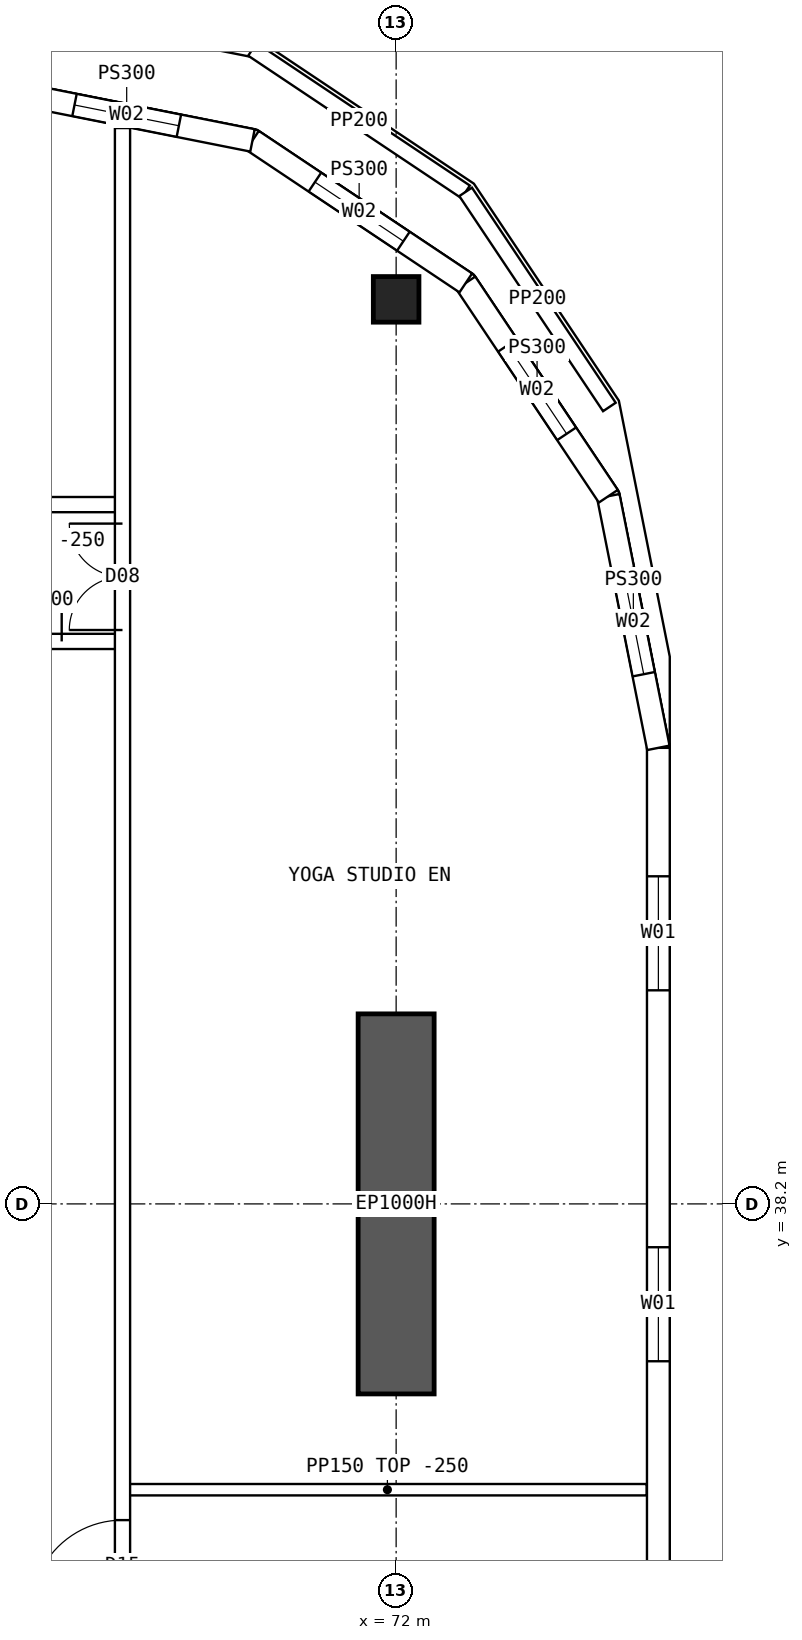
"""IFC4 building model, lengths in metres.
Left out: names, types, materials, properties, quantities, classifications, styles, units other than length and angle.
Written with IfcOpenShell. Run it as: python <this file> out.ifc"""

import sys

from ifc_helpers import new_model, si_unit, direction, frame, frame_2d, origin, origin_2d, place, context, subcontext, project, spatial, polyline, rectangle, hollow_rectangle, outline, extrude, element, fill, save


model = new_model("IFC4")
c1 = context("Model", 3, precision=1e-05, world=origin(), true_north=direction((0.0, 1.0)))
c2 = subcontext(c1, "Body", "Model", "MODEL_VIEW")
j1 = project(units=[si_unit("LENGTHUNIT", "METRE"), si_unit("PLANEANGLEUNIT", "RADIAN")], contexts=[c1])
p1 = place(None, origin())
s1 = spatial("IfcSite", under=j1, at=p1, CompositionType="ELEMENT")
p2 = place(p1, origin())
s2 = spatial("IfcBuilding", under=s1, at=p2, CompositionType="ELEMENT")
p3 = place(p2, frame((0.0, 0.0, 208.3)))
s3 = spatial("IfcBuildingStorey", under=s2, at=p3, CompositionType="ELEMENT", Elevation=208.3)
p4 = place(p3, frame((72.0, 50.1, 0.0), z_axis=(0.0, 0.0, 1.0), x_axis=(1.0, 0.0, 0.0)))
e1 = element("IfcColumn", 1, at=p4, inside=s3, PredefinedType="COLUMN", context=c2, shape_type="SweptSolid", body=[
    extrude(hollow_rectangle(XDim=0.6, YDim=0.6, WallThickness=0.06, at=origin_2d()), origin(), (0.0, 0.0, 1.0), 4.5),
])
p5 = place(p3, frame((72.0, 35.7, 0.0), z_axis=(0.0, 0.0, 1.0), x_axis=(0.0, 1.0, 0.0)))
e2 = element("IfcWall", 2, at=p5, inside=s3, PredefinedType="SHEAR", context=c2, shape_type="SweptSolid", body=[
    extrude(rectangle(XDim=5.0, YDim=1.0, at=frame_2d((2.5, 0.0))), origin(), (0.0, 0.0, 1.0), 4.5),
])
p6 = place(p3, frame((75.45, 19.8, 0.0), z_axis=(0.0, 0.0, 1.0), x_axis=(0.0, 1.0, 0.0)))
e3 = element("IfcWall", 3, at=p6, inside=s3, PredefinedType="SOLIDWALL", context=c2, shape_type="SweptSolid", body=[
    extrude(outline(polyline([(-0.015, -0.15), (24.415, -0.15), (24.385, 0.15), (0.015, 0.15), (-0.015, -0.15)])), origin(), (0.0, 0.0, 1.0), 4.25),
])
p7 = place(p6, frame((1.69, 0.0, 0.9)))
e4 = element("IfcOpeningElement", 4, at=p7, cuts=e3, PredefinedType="OPENING", context=c2, shape_type="SweptSolid", body=[
    extrude(rectangle(XDim=1.5, YDim=2.0, at=frame_2d((0.75, 1.0))), frame((0.0, 0.16, 0.0), z_axis=(0.0, -1.0, 0.0), x_axis=(1.0, 0.0, 0.0)), (0.0, 0.0, 1.0), 0.32),
])
p8 = place(p6, frame((6.57, 0.0, 0.9)))
e5 = element("IfcOpeningElement", 5, at=p8, cuts=e3, PredefinedType="OPENING", context=c2, shape_type="SweptSolid", body=[
    extrude(rectangle(XDim=1.5, YDim=2.0, at=frame_2d((0.75, 1.0))), frame((0.0, 0.16, 0.0), z_axis=(0.0, -1.0, 0.0), x_axis=(1.0, 0.0, 0.0)), (0.0, 0.0, 1.0), 0.32),
])
p9 = place(p6, frame((11.45, 0.0, 0.9)))
e6 = element("IfcOpeningElement", 6, at=p9, cuts=e3, PredefinedType="OPENING", context=c2, shape_type="SweptSolid", body=[
    extrude(rectangle(XDim=1.5, YDim=2.0, at=frame_2d((0.75, 1.0))), frame((0.0, 0.16, 0.0), z_axis=(0.0, -1.0, 0.0), x_axis=(1.0, 0.0, 0.0)), (0.0, 0.0, 1.0), 0.32),
])
p10 = place(p6, frame((16.33, 0.0, 0.9)))
e7 = element("IfcOpeningElement", 7, at=p10, cuts=e3, PredefinedType="OPENING", context=c2, shape_type="SweptSolid", body=[
    extrude(rectangle(XDim=1.5, YDim=2.0, at=frame_2d((0.75, 1.0))), frame((0.0, 0.16, 0.0), z_axis=(0.0, -1.0, 0.0), x_axis=(1.0, 0.0, 0.0)), (0.0, 0.0, 1.0), 0.32),
])
p11 = place(p6, frame((21.21, 0.0, 0.9)))
e8 = element("IfcOpeningElement", 8, at=p11, cuts=e3, PredefinedType="OPENING", context=c2, shape_type="SweptSolid", body=[
    extrude(rectangle(XDim=1.5, YDim=2.0, at=frame_2d((0.75, 1.0))), frame((0.0, 0.16, 0.0), z_axis=(0.0, -1.0, 0.0), x_axis=(1.0, 0.0, 0.0)), (0.0, 0.0, 1.0), 0.32),
])
p12 = place(p3, frame((75.45, 44.2, 0.0), z_axis=(0.0, 0.0, 1.0), x_axis=(-0.19508664885, 0.980786011034, 0.0)))
e9 = element("IfcWall", 9, at=p12, inside=s3, PredefinedType="SOLIDWALL", context=c2, shape_type="SweptSolid", body=[
    extrude(outline(polyline([(-0.015, -0.15), (3.405, -0.15), (3.345, 0.15), (0.015, 0.15), (-0.015, -0.15)])), origin(), (0.0, 0.0, 1.0), 4.25),
])
p13 = place(p12, frame((0.988, 0.0, 0.9)))
e10 = element("IfcOpeningElement", 10, at=p13, cuts=e9, PredefinedType="OPENING", context=c2, shape_type="SweptSolid", body=[
    extrude(rectangle(XDim=1.4, YDim=1.8, at=frame_2d((0.7, 0.9))), frame((0.0, 0.16, 0.0), z_axis=(0.0, -1.0, 0.0), x_axis=(1.0, 0.0, 0.0)), (0.0, 0.0, 1.0), 0.32),
])
p14 = place(p3, frame((74.792, 47.51, 0.0), z_axis=(0.0, 0.0, 1.0), x_axis=(-0.555567969291, 0.831471124873, 0.0)))
e11 = element("IfcWall", 11, at=p14, inside=s3, PredefinedType="SOLIDWALL", context=c2, shape_type="SweptSolid", body=[
    extrude(outline(polyline([(-0.03, -0.15), (3.405, -0.15), (3.345, 0.15), (0.03, 0.15), (-0.03, -0.15)])), origin(), (0.0, 0.0, 1.0), 4.25),
])
p15 = place(p14, frame((0.988, 0.0, 0.9)))
e12 = element("IfcOpeningElement", 12, at=p15, cuts=e11, PredefinedType="OPENING", context=c2, shape_type="SweptSolid", body=[
    extrude(rectangle(XDim=1.4, YDim=1.8, at=frame_2d((0.7, 0.9))), frame((0.0, 0.16, 0.0), z_axis=(0.0, -1.0, 0.0), x_axis=(1.0, 0.0, 0.0)), (0.0, 0.0, 1.0), 0.32),
])
p16 = place(p3, frame((72.917, 50.316, 0.0), z_axis=(0.0, 0.0, 1.0), x_axis=(-0.831460037396, 0.555584562613, 0.0)))
e13 = element("IfcWall", 13, at=p16, inside=s3, PredefinedType="SOLIDWALL", context=c2, shape_type="SweptSolid", body=[
    extrude(outline(polyline([(-0.03, -0.15), (3.405, -0.15), (3.345, 0.15), (0.03, 0.15), (-0.03, -0.15)])), origin(), (0.0, 0.0, 1.0), 4.25),
])
p17 = place(p16, frame((0.988, 0.0, 0.9)))
e14 = element("IfcOpeningElement", 14, at=p17, cuts=e13, PredefinedType="OPENING", context=c2, shape_type="SweptSolid", body=[
    extrude(rectangle(XDim=1.4, YDim=1.8, at=frame_2d((0.7, 0.9))), frame((0.0, 0.16, 0.0), z_axis=(0.0, -1.0, 0.0), x_axis=(1.0, 0.0, 0.0)), (0.0, 0.0, 1.0), 0.32),
])
p18 = place(p3, frame((70.11, 52.192, 0.0), z_axis=(0.0, 0.0, 1.0), x_axis=(-0.98078325777, 0.195100490205, 0.0)))
e15 = element("IfcWall", 15, at=p18, inside=s3, PredefinedType="SOLIDWALL", context=c2, shape_type="SweptSolid", body=[
    extrude(outline(polyline([(-0.03, -0.15), (3.405, -0.15), (3.345, 0.15), (0.03, 0.15), (-0.03, -0.15)])), origin(), (0.0, 0.0, 1.0), 4.25),
])
p19 = place(p18, frame((0.988, 0.0, 0.9)))
e16 = element("IfcOpeningElement", 16, at=p19, cuts=e15, PredefinedType="OPENING", context=c2, shape_type="SweptSolid", body=[
    extrude(rectangle(XDim=1.4, YDim=1.8, at=frame_2d((0.7, 0.9))), frame((0.0, 0.16, 0.0), z_axis=(0.0, -1.0, 0.0), x_axis=(1.0, 0.0, 0.0)), (0.0, 0.0, 1.0), 0.32),
])
p20 = place(p3, frame((66.785, 54.05, 0.0), z_axis=(0.0, 0.0, 1.0), x_axis=(0.980787925163, -0.195077025438, 0.0)))
e17 = element("IfcWall", 17, at=p20, inside=s3, PredefinedType="PARAPET", context=c2, shape_type="SweptSolid", body=[
    extrude(rectangle(XDim=3.389, YDim=0.2, at=frame_2d((1.695, 0.0))), origin(), (0.0, 0.0, 1.0), 1.1),
])
p21 = place(p3, frame((70.109, 53.389, 0.0), z_axis=(0.0, 0.0, 1.0), x_axis=(0.831448637767, -0.555601622348, 0.0)))
e18 = element("IfcWall", 18, at=p21, inside=s3, PredefinedType="PARAPET", context=c2, shape_type="SweptSolid", body=[
    extrude(rectangle(XDim=3.374, YDim=0.2, at=frame_2d((1.687, 0.0))), origin(), (0.0, 0.0, 1.0), 1.1),
])
p22 = place(p3, frame((72.914, 51.514, 0.0), z_axis=(0.0, 0.0, 1.0), x_axis=(0.555593699073, -0.831453932308, 0.0)))
e19 = element("IfcWall", 19, at=p22, inside=s3, PredefinedType="PARAPET", context=c2, shape_type="SweptSolid", body=[
    extrude(rectangle(XDim=3.404, YDim=0.2, at=frame_2d((1.702, 0.0))), origin(), (0.0, 0.0, 1.0), 1.1),
])
p23 = place(p3, frame((66.35, 47.4, 0.0), z_axis=(0.0, 0.0, 1.0), x_axis=(1.0, 0.0, 0.0)))
e20 = element("IfcWall", 20, at=p23, inside=s3, PredefinedType="SOLIDWALL", context=c2, shape_type="SweptSolid", body=[
    extrude(rectangle(XDim=2.05, YDim=0.2, at=frame_2d((1.025, 0.0))), origin(), (0.0, 0.0, 1.0), 4.25),
])
p24 = place(p23, frame((0.2, 0.0, 0.0)))
e21 = element("IfcOpeningElement", 21, at=p24, cuts=e20, PredefinedType="OPENING", context=c2, shape_type="SweptSolid", body=[
    extrude(rectangle(XDim=0.9, YDim=2.1, at=frame_2d((0.45, 1.05))), frame((0.0, 0.11, 0.0), z_axis=(0.0, -1.0, 0.0), x_axis=(1.0, 0.0, 0.0)), (0.0, 0.0, 1.0), 0.22),
])
p25 = place(p3, frame((66.35, 45.6, 0.0), z_axis=(0.0, 0.0, 1.0), x_axis=(1.0, 0.0, 0.0)))
e22 = element("IfcWall", 22, at=p25, inside=s3, PredefinedType="SOLIDWALL", context=c2, shape_type="SweptSolid", body=[
    extrude(rectangle(XDim=2.05, YDim=0.2, at=frame_2d((1.025, 0.0))), origin(), (0.0, 0.0, 1.0), 4.25),
])
p26 = place(p25, frame((0.05, 0.0, 0.0)))
e23 = element("IfcOpeningElement", 23, at=p26, cuts=e22, PredefinedType="OPENING", context=c2, shape_type="SweptSolid", body=[
    extrude(rectangle(XDim=1.2, YDim=2.1, at=frame_2d((0.6, 1.05))), frame((0.0, 0.11, 0.0), z_axis=(0.0, -1.0, 0.0), x_axis=(1.0, 0.0, 0.0)), (0.0, 0.0, 1.0), 0.22),
])
p27 = place(p3, frame((68.4, 11.646, 0.0), z_axis=(0.0, 0.0, 1.0), x_axis=(0.0, 1.0, 0.0)))
e24 = element("IfcWall", 24, at=p27, inside=s3, PredefinedType="SOLIDWALL", context=c2, shape_type="SweptSolid", body=[
    extrude(rectangle(XDim=40.708, YDim=0.2, at=frame_2d((20.354, 0.0))), origin(), (0.0, 0.0, 1.0), 4.25),
])
p28 = place(p27, frame((13.434, 0.0, 0.0)))
e25 = element("IfcOpeningElement", 25, at=p28, cuts=e24, PredefinedType="OPENING", context=c2, shape_type="SweptSolid", body=[
    extrude(rectangle(XDim=1.2, YDim=2.1, at=frame_2d((0.6, 1.05))), frame((0.0, 0.11, 0.0), z_axis=(0.0, -1.0, 0.0), x_axis=(1.0, 0.0, 0.0)), (0.0, 0.0, 1.0), 0.22),
])
p29 = place(p27, frame((21.194, 0.0, 0.0)))
e26 = element("IfcOpeningElement", 26, at=p29, cuts=e24, PredefinedType="OPENING", context=c2, shape_type="SweptSolid", body=[
    extrude(rectangle(XDim=1.2, YDim=2.1, at=frame_2d((0.6, 1.05))), frame((0.0, 0.11, 0.0), z_axis=(0.0, -1.0, 0.0), x_axis=(1.0, 0.0, 0.0)), (0.0, 0.0, 1.0), 0.22),
])
p30 = place(p27, frame((5.104, 0.0, 0.0)))
e27 = element("IfcOpeningElement", 27, at=p30, cuts=e24, PredefinedType="OPENING", context=c2, shape_type="SweptSolid", body=[
    extrude(rectangle(XDim=1.4, YDim=2.1, at=frame_2d((0.7, 1.05))), frame((0.0, 0.11, 0.0), z_axis=(0.0, -1.0, 0.0), x_axis=(1.0, 0.0, 0.0)), (0.0, 0.0, 1.0), 0.22),
])
p31 = place(p27, frame((34.104, 0.0, 0.0)))
e28 = element("IfcOpeningElement", 28, at=p31, cuts=e24, PredefinedType="OPENING", context=c2, shape_type="SweptSolid", body=[
    extrude(rectangle(XDim=1.4, YDim=2.1, at=frame_2d((0.7, 1.05))), frame((0.0, 0.11, 0.0), z_axis=(0.0, -1.0, 0.0), x_axis=(1.0, 0.0, 0.0)), (0.0, 0.0, 1.0), 0.22),
])
p32 = place(p3, frame((68.475, 34.44, 0.0), z_axis=(0.0, 0.0, 1.0), x_axis=(1.0, 0.0, 0.0)))
e29 = element("IfcWall", 29, at=p32, inside=s3, PredefinedType="PARTITIONING", context=c2, shape_type="SweptSolid", body=[
    extrude(outline(polyline([(0.0, 0.0), (6.82, 0.0), (6.82, 4.25), (3.827, 4.25), (3.825, 3.8), (3.227, 3.8), (3.225, 4.25), (0.0, 4.25), (0.0, 0.0)])), frame((0.0, 0.075, 0.0), z_axis=(0.0, -1.0, 0.0), x_axis=(1.0, 0.0, 0.0)), (0.0, 0.0, 1.0), 0.15),
])
p33 = place(p10, origin())
e30 = element("IfcWindow", 30, at=p33, inside=s3, PartitioningType="SINGLE_PANEL", PredefinedType="WINDOW", context=c2, shape_type="SweptSolid", body=[
    extrude(rectangle(XDim=1.5, YDim=2.0, at=frame_2d((0.75, 1.0))), frame((0.0, 0.03, 0.0), z_axis=(0.0, -1.0, 0.0), x_axis=(1.0, 0.0, 0.0)), (0.0, 0.0, 1.0), 0.06),
])
fill(e7, e30)
p34 = place(p11, origin())
e31 = element("IfcWindow", 31, at=p34, inside=s3, PartitioningType="SINGLE_PANEL", PredefinedType="WINDOW", context=c2, shape_type="SweptSolid", body=[
    extrude(rectangle(XDim=1.5, YDim=2.0, at=frame_2d((0.75, 1.0))), frame((0.0, 0.03, 0.0), z_axis=(0.0, -1.0, 0.0), x_axis=(1.0, 0.0, 0.0)), (0.0, 0.0, 1.0), 0.06),
])
fill(e8, e31)
p35 = place(p13, origin())
e32 = element("IfcWindow", 32, at=p35, inside=s3, PartitioningType="SINGLE_PANEL", PredefinedType="WINDOW", context=c2, shape_type="SweptSolid", body=[
    extrude(rectangle(XDim=1.4, YDim=1.8, at=frame_2d((0.7, 0.9))), frame((0.0, 0.03, 0.0), z_axis=(0.0, -1.0, 0.0), x_axis=(1.0, 0.0, 0.0)), (0.0, 0.0, 1.0), 0.06),
])
fill(e10, e32)
p36 = place(p15, origin())
e33 = element("IfcWindow", 33, at=p36, inside=s3, PartitioningType="SINGLE_PANEL", PredefinedType="WINDOW", context=c2, shape_type="SweptSolid", body=[
    extrude(rectangle(XDim=1.4, YDim=1.8, at=frame_2d((0.7, 0.9))), frame((0.0, 0.03, 0.0), z_axis=(0.0, -1.0, 0.0), x_axis=(1.0, 0.0, 0.0)), (0.0, 0.0, 1.0), 0.06),
])
fill(e12, e33)
p37 = place(p17, origin())
e34 = element("IfcWindow", 34, at=p37, inside=s3, PartitioningType="SINGLE_PANEL", PredefinedType="WINDOW", context=c2, shape_type="SweptSolid", body=[
    extrude(rectangle(XDim=1.4, YDim=1.8, at=frame_2d((0.7, 0.9))), frame((0.0, 0.03, 0.0), z_axis=(0.0, -1.0, 0.0), x_axis=(1.0, 0.0, 0.0)), (0.0, 0.0, 1.0), 0.06),
])
fill(e14, e34)
p38 = place(p19, origin())
e35 = element("IfcWindow", 35, at=p38, inside=s3, PartitioningType="SINGLE_PANEL", PredefinedType="WINDOW", context=c2, shape_type="SweptSolid", body=[
    extrude(rectangle(XDim=1.4, YDim=1.8, at=frame_2d((0.7, 0.9))), frame((0.0, 0.03, 0.0), z_axis=(0.0, -1.0, 0.0), x_axis=(1.0, 0.0, 0.0)), (0.0, 0.0, 1.0), 0.06),
])
fill(e16, e35)
p39 = place(p26, origin())
e36 = element("IfcDoor", 36, at=p39, inside=s3, OperationType="DOUBLE_DOOR_SINGLE_SWING", PredefinedType="DOOR", context=c2, shape_type="SweptSolid", body=[
    extrude(rectangle(XDim=1.2, YDim=2.1, at=frame_2d((0.6, 1.05))), frame((0.0, 0.025, 0.0), z_axis=(0.0, -1.0, 0.0), x_axis=(1.0, 0.0, 0.0)), (0.0, 0.0, 1.0), 0.05),
])
fill(e23, e36)
p40 = place(p29, origin())
e37 = element("IfcDoor", 37, at=p40, inside=s3, OperationType="SINGLE_SWING_LEFT", PredefinedType="DOOR", context=c2, shape_type="SweptSolid", body=[
    extrude(rectangle(XDim=1.2, YDim=2.1, at=frame_2d((0.6, 1.05))), frame((0.0, 0.025, 0.0), z_axis=(0.0, -1.0, 0.0), x_axis=(1.0, 0.0, 0.0)), (0.0, 0.0, 1.0), 0.05),
])
fill(e26, e37)
p41 = place(p31, origin())
e38 = element("IfcDoor", 38, at=p41, inside=s3, OperationType="DOUBLE_DOOR_SINGLE_SWING", PredefinedType="DOOR", context=c2, shape_type="SweptSolid", body=[
    extrude(rectangle(XDim=1.4, YDim=2.1, at=frame_2d((0.7, 1.05))), frame((0.0, 0.025, 0.0), z_axis=(0.0, -1.0, 0.0), x_axis=(1.0, 0.0, 0.0)), (0.0, 0.0, 1.0), 0.05),
])
fill(e28, e38)
save(model, sys.argv[1])
